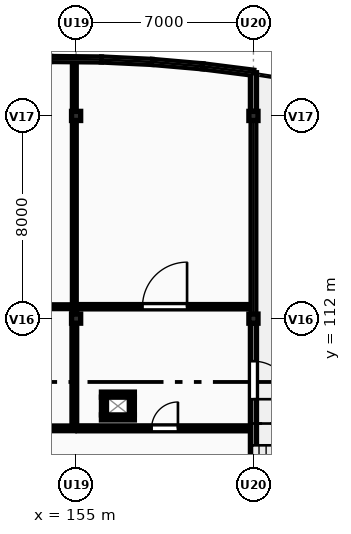
"""IFC4 building model, lengths in metres.
Left out: names, types, materials, properties, quantities, classifications, styles, units other than length and angle.
Written with IfcOpenShell. Run it as: python <this file> out.ifc"""

import sys

from ifc_helpers import new_model, si_unit, direction, frame, frame_2d, origin, origin_2d, place, context, subcontext, project, spatial, rectangle, extrude, element, fill, save


model = new_model("IFC4")
c1 = context("Model", 3, precision=1e-05, world=origin(), true_north=direction((0.0, 1.0)))
c2 = subcontext(c1, "Body", "Model", "MODEL_VIEW")
j1 = project(units=[si_unit("LENGTHUNIT", "METRE"), si_unit("PLANEANGLEUNIT", "RADIAN")], contexts=[c1])
p1 = place(None, origin())
s1 = spatial("IfcSite", under=j1, at=p1, CompositionType="ELEMENT")
p2 = place(p1, origin())
s2 = spatial("IfcBuilding", under=s1, at=p2, CompositionType="ELEMENT")
p3 = place(p2, frame((0.0, 0.0, 12.3)))
s3 = spatial("IfcBuildingStorey", under=s2, at=p3, CompositionType="ELEMENT", Elevation=12.3)
for number, where, z_axis, x_axis in (
    (1, (155.0, 112.0, 0.0), (0.0, 0.0, 1.0), (1.0, 0.0, 0.0)),
    (2, (155.0, 120.0, 0.0), (0.0, 0.0, 1.0), (1.0, 0.0, 0.0)),
    (3, (162.0, 112.0, 0.0), (0.0, 0.0, 1.0), (1.0, 0.0, 0.0)),
    (4, (162.0, 120.0, 0.0), (0.0, 0.0, 1.0), (1.0, 0.0, 0.0)),
):
    element("IfcColumn", number, at=place(p3, frame(where, z_axis=z_axis, x_axis=x_axis)), inside=s3, PredefinedType="COLUMN", context=c2, shape_type="SweptSolid", body=[
        extrude(rectangle(XDim=0.36, YDim=0.36, at=origin_2d()), origin(), (0.0, 0.0, 1.0), 3.9),
    ])
p4 = place(p3, frame((154.0, 122.247, 0.0), z_axis=(0.0, 0.0, 1.0), x_axis=(0.999953504169, -0.009643106302, 0.0)))
e5 = element("IfcWall", 5, at=p4, inside=s3, PredefinedType="SOLIDWALL", context=c2, shape_type="SweptSolid", body=[
    extrude(rectangle(XDim=2.0, YDim=0.2, at=frame_2d((1.0, 0.0))), origin(), (0.0, 0.0, 1.0), 0.95),
])
p5 = place(p3, frame((156.0, 122.228, 0.0), z_axis=(0.0, 0.0, 1.0), x_axis=(0.99884540439, -0.048040172037, 0.0)))
e6 = element("IfcWall", 6, at=p5, inside=s3, PredefinedType="SOLIDWALL", context=c2, shape_type="SweptSolid", body=[
    extrude(rectangle(XDim=2.002, YDim=0.2, at=frame_2d((1.001, 0.0))), origin(), (0.0, 0.0, 1.0), 0.95),
])
p6 = place(p3, frame((158.0, 122.132, 0.0), z_axis=(0.0, 0.0, 1.0), x_axis=(0.996244237948, -0.086587633962, 0.0)))
e7 = element("IfcWall", 7, at=p6, inside=s3, PredefinedType="SOLIDWALL", context=c2, shape_type="SweptSolid", body=[
    extrude(rectangle(XDim=2.008, YDim=0.2, at=frame_2d((1.004, 0.0))), origin(), (0.0, 0.0, 1.0), 0.95),
])
p7 = place(p3, frame((160.0, 121.958, 0.0), z_axis=(0.0, 0.0, 1.0), x_axis=(0.992158168336, -0.124988675503, 0.0)))
e8 = element("IfcWall", 8, at=p7, inside=s3, PredefinedType="SOLIDWALL", context=c2, shape_type="SweptSolid", body=[
    extrude(rectangle(XDim=2.016, YDim=0.2, at=frame_2d((1.008, 0.0))), origin(), (0.0, 0.0, 1.0), 0.95),
])
p8 = place(p3, frame((162.0, 121.706, 0.0), z_axis=(0.0, 0.0, 1.0), x_axis=(0.0, -1.0, 0.0)))
e9 = element("IfcWall", 9, at=p8, inside=s3, PredefinedType="SOLIDWALL", context=c2, shape_type="SweptSolid", body=[
    extrude(rectangle(XDim=1.526, YDim=0.24, at=frame_2d((0.763, 0.0))), origin(), (0.0, 0.0, 1.0), 3.088),
])
p9 = place(p3, frame((162.0, 119.82, 0.0), z_axis=(0.0, 0.0, 1.0), x_axis=(0.0, -1.0, 0.0)))
e10 = element("IfcWall", 10, at=p9, inside=s3, PredefinedType="SOLIDWALL", context=c2, shape_type="SweptSolid", body=[
    extrude(rectangle(XDim=7.64, YDim=0.185, at=frame_2d((3.82, 0.0))), origin(), (0.0, 0.0, 1.0), 0.95),
])
p10 = place(p3, frame((162.0, 111.82, 0.0), z_axis=(0.0, 0.0, 1.0), x_axis=(0.0, -1.0, 0.0)))
e11 = element("IfcWall", 11, at=p10, inside=s3, PredefinedType="SOLIDWALL", context=c2, shape_type="SweptSolid", body=[
    extrude(rectangle(XDim=7.64, YDim=0.24, at=frame_2d((3.82, 0.0))), origin(), (0.0, 0.0, 1.0), 3.65),
])
p11 = place(p10, frame((1.5, 0.0, 0.0)))
e12 = element("IfcOpeningElement", 12, at=p11, cuts=e11, PredefinedType="OPENING", context=c2, shape_type="SweptSolid", body=[
    extrude(rectangle(XDim=1.5, YDim=2.15, at=frame_2d((0.75, 1.075))), frame((0.0, 0.13, 0.0), z_axis=(0.0, -1.0, 0.0), x_axis=(1.0, 0.0, 0.0)), (0.0, 0.0, 1.0), 0.26),
])
for number, where, z_axis, x_axis in (
    (13, (157.3, 108.1, 0.0), (0.0, 0.0, 1.0), (-1.0, 0.0, 0.0)),
    (14, (156.0, 109.0, 0.0), (0.0, 0.0, 1.0), (1.0, 0.0, 0.0)),
):
    element("IfcWall", number, at=place(p3, frame(where, z_axis=z_axis, x_axis=x_axis)), inside=s3, PredefinedType="PARTITIONING", context=c2, shape_type="SweptSolid", body=[
        extrude(rectangle(XDim=1.3, YDim=0.2, at=frame_2d((0.65, 0.0))), origin(), (0.0, 0.0, 1.0), 3.65),
    ])
p12 = place(p3, frame((156.1, 108.2, 0.0), z_axis=(0.0, 0.0, 1.0), x_axis=(0.0, 1.0, 0.0)))
e15 = element("IfcWall", 15, at=p12, inside=s3, PredefinedType="PARTITIONING", context=c2, shape_type="SweptSolid", body=[
    extrude(rectangle(XDim=0.7, YDim=0.2, at=frame_2d((0.35, 0.0))), origin(), (0.0, 0.0, 1.0), 3.65),
])
p13 = place(p3, frame((157.2, 108.9, 0.0), z_axis=(0.0, 0.0, 1.0), x_axis=(0.0, -1.0, 0.0)))
e16 = element("IfcWall", 16, at=p13, inside=s3, PredefinedType="PARTITIONING", context=c2, shape_type="SweptSolid", body=[
    extrude(rectangle(XDim=0.7, YDim=0.2, at=frame_2d((0.35, 0.0))), origin(), (0.0, 0.0, 1.0), 3.248),
])
p14 = place(p3, frame((148.0, 112.47, 0.0), z_axis=(0.0, 0.0, 1.0), x_axis=(1.0, 0.0, 0.0)))
e17 = element("IfcWall", 17, at=p14, inside=s3, PredefinedType="PARTITIONING", context=c2, shape_type="SweptSolid", body=[
    extrude(rectangle(XDim=6.93, YDim=0.15, at=frame_2d((3.465, 0.0))), origin(), (0.0, 0.0, 1.0), 3.65),
])
p15 = place(p3, frame((154.93, 112.56, 0.0), z_axis=(0.0, 0.0, 1.0), x_axis=(0.0, 1.0, 0.0)))
e18 = element("IfcWall", 18, at=p15, inside=s3, PredefinedType="PARTITIONING", context=c2, shape_type="SweptSolid", body=[
    extrude(rectangle(XDim=9.536, YDim=0.15, at=frame_2d((4.768, 0.0))), origin(), (0.0, 0.0, 1.0), 3.088),
])
p16 = place(p3, frame((155.07, 112.47, 0.0), z_axis=(0.0, 0.0, 1.0), x_axis=(1.0, 0.0, 0.0)))
e19 = element("IfcWall", 19, at=p16, inside=s3, PredefinedType="PARTITIONING", context=c2, shape_type="SweptSolid", body=[
    extrude(rectangle(XDim=6.795, YDim=0.17, at=frame_2d((3.398, 0.0))), origin(), (0.0, 0.0, 1.0), 3.65),
])
p17 = place(p16, frame((2.55, 0.0, 0.0)))
e20 = element("IfcOpeningElement", 20, at=p17, cuts=e19, PredefinedType="OPENING", context=c2, shape_type="SweptSolid", body=[
    extrude(rectangle(XDim=1.76, YDim=2.2, at=frame_2d((0.88, 1.1))), frame((0.0, 0.095, 0.0), z_axis=(0.0, -1.0, 0.0), x_axis=(1.0, 0.0, 0.0)), (0.0, 0.0, 1.0), 0.19),
])
p18 = place(p3, frame((148.0, 107.67, 0.0), z_axis=(0.0, 0.0, 1.0), x_axis=(1.0, 0.0, 0.0)))
e21 = element("IfcWall", 21, at=p18, inside=s3, PredefinedType="PARTITIONING", context=c2, shape_type="SweptSolid", body=[
    extrude(rectangle(XDim=6.93, YDim=0.185, at=frame_2d((3.465, 0.0))), origin(), (0.0, 0.0, 1.0), 3.65),
])
p19 = place(p3, frame((154.93, 107.778, 0.0), z_axis=(0.0, 0.0, 1.0), x_axis=(0.0, 1.0, 0.0)))
e22 = element("IfcWall", 22, at=p19, inside=s3, PredefinedType="PARTITIONING", context=c2, shape_type="SweptSolid", body=[
    extrude(rectangle(XDim=4.552, YDim=0.185, at=frame_2d((2.276, 0.0))), origin(), (0.0, 0.0, 1.0), 3.088),
])
p20 = place(p3, frame((155.07, 107.67, 0.0), z_axis=(0.0, 0.0, 1.0), x_axis=(1.0, 0.0, 0.0)))
e23 = element("IfcWall", 23, at=p20, inside=s3, PredefinedType="PARTITIONING", context=c2, shape_type="SweptSolid", body=[
    extrude(rectangle(XDim=6.768, YDim=0.195, at=frame_2d((3.384, 0.0))), origin(), (0.0, 0.0, 1.0), 3.65),
])
p21 = place(p20, frame((2.91, 0.0, 0.0)))
e24 = element("IfcOpeningElement", 24, at=p21, cuts=e23, PredefinedType="OPENING", context=c2, shape_type="SweptSolid", body=[
    extrude(rectangle(XDim=1.04, YDim=2.25, at=frame_2d((0.52, 1.125))), frame((0.0, 0.107, 0.0), z_axis=(0.0, -1.0, 0.0), x_axis=(1.0, 0.0, 0.0)), (0.0, 0.0, 1.0), 0.215),
])
p22 = place(p11, origin())
e25 = element("IfcDoor", 25, at=p22, inside=s3, OperationType="SINGLE_SWING_RIGHT", PredefinedType="DOOR", context=c2, shape_type="SweptSolid", body=[
    extrude(rectangle(XDim=1.5, YDim=2.15, at=frame_2d((0.75, 1.075))), frame((0.0, 0.025, 0.0), z_axis=(0.0, -1.0, 0.0), x_axis=(1.0, 0.0, 0.0)), (0.0, 0.0, 1.0), 0.05),
])
fill(e12, e25)
p23 = place(p17, origin())
e26 = element("IfcDoor", 26, at=p23, inside=s3, OperationType="SINGLE_SWING_RIGHT", PredefinedType="DOOR", context=c2, shape_type="SweptSolid", body=[
    extrude(rectangle(XDim=1.76, YDim=2.2, at=frame_2d((0.88, 1.1))), frame((0.0, 0.025, 0.0), z_axis=(0.0, -1.0, 0.0), x_axis=(1.0, 0.0, 0.0)), (0.0, 0.0, 1.0), 0.05),
])
fill(e20, e26)
p24 = place(p21, origin())
e27 = element("IfcDoor", 27, at=p24, inside=s3, OperationType="SINGLE_SWING_RIGHT", PredefinedType="DOOR", context=c2, shape_type="SweptSolid", body=[
    extrude(rectangle(XDim=1.04, YDim=2.25, at=frame_2d((0.52, 1.125))), frame((0.0, 0.025, 0.0), z_axis=(0.0, -1.0, 0.0), x_axis=(1.0, 0.0, 0.0)), (0.0, 0.0, 1.0), 0.05),
])
fill(e24, e27)
save(model, sys.argv[1])
